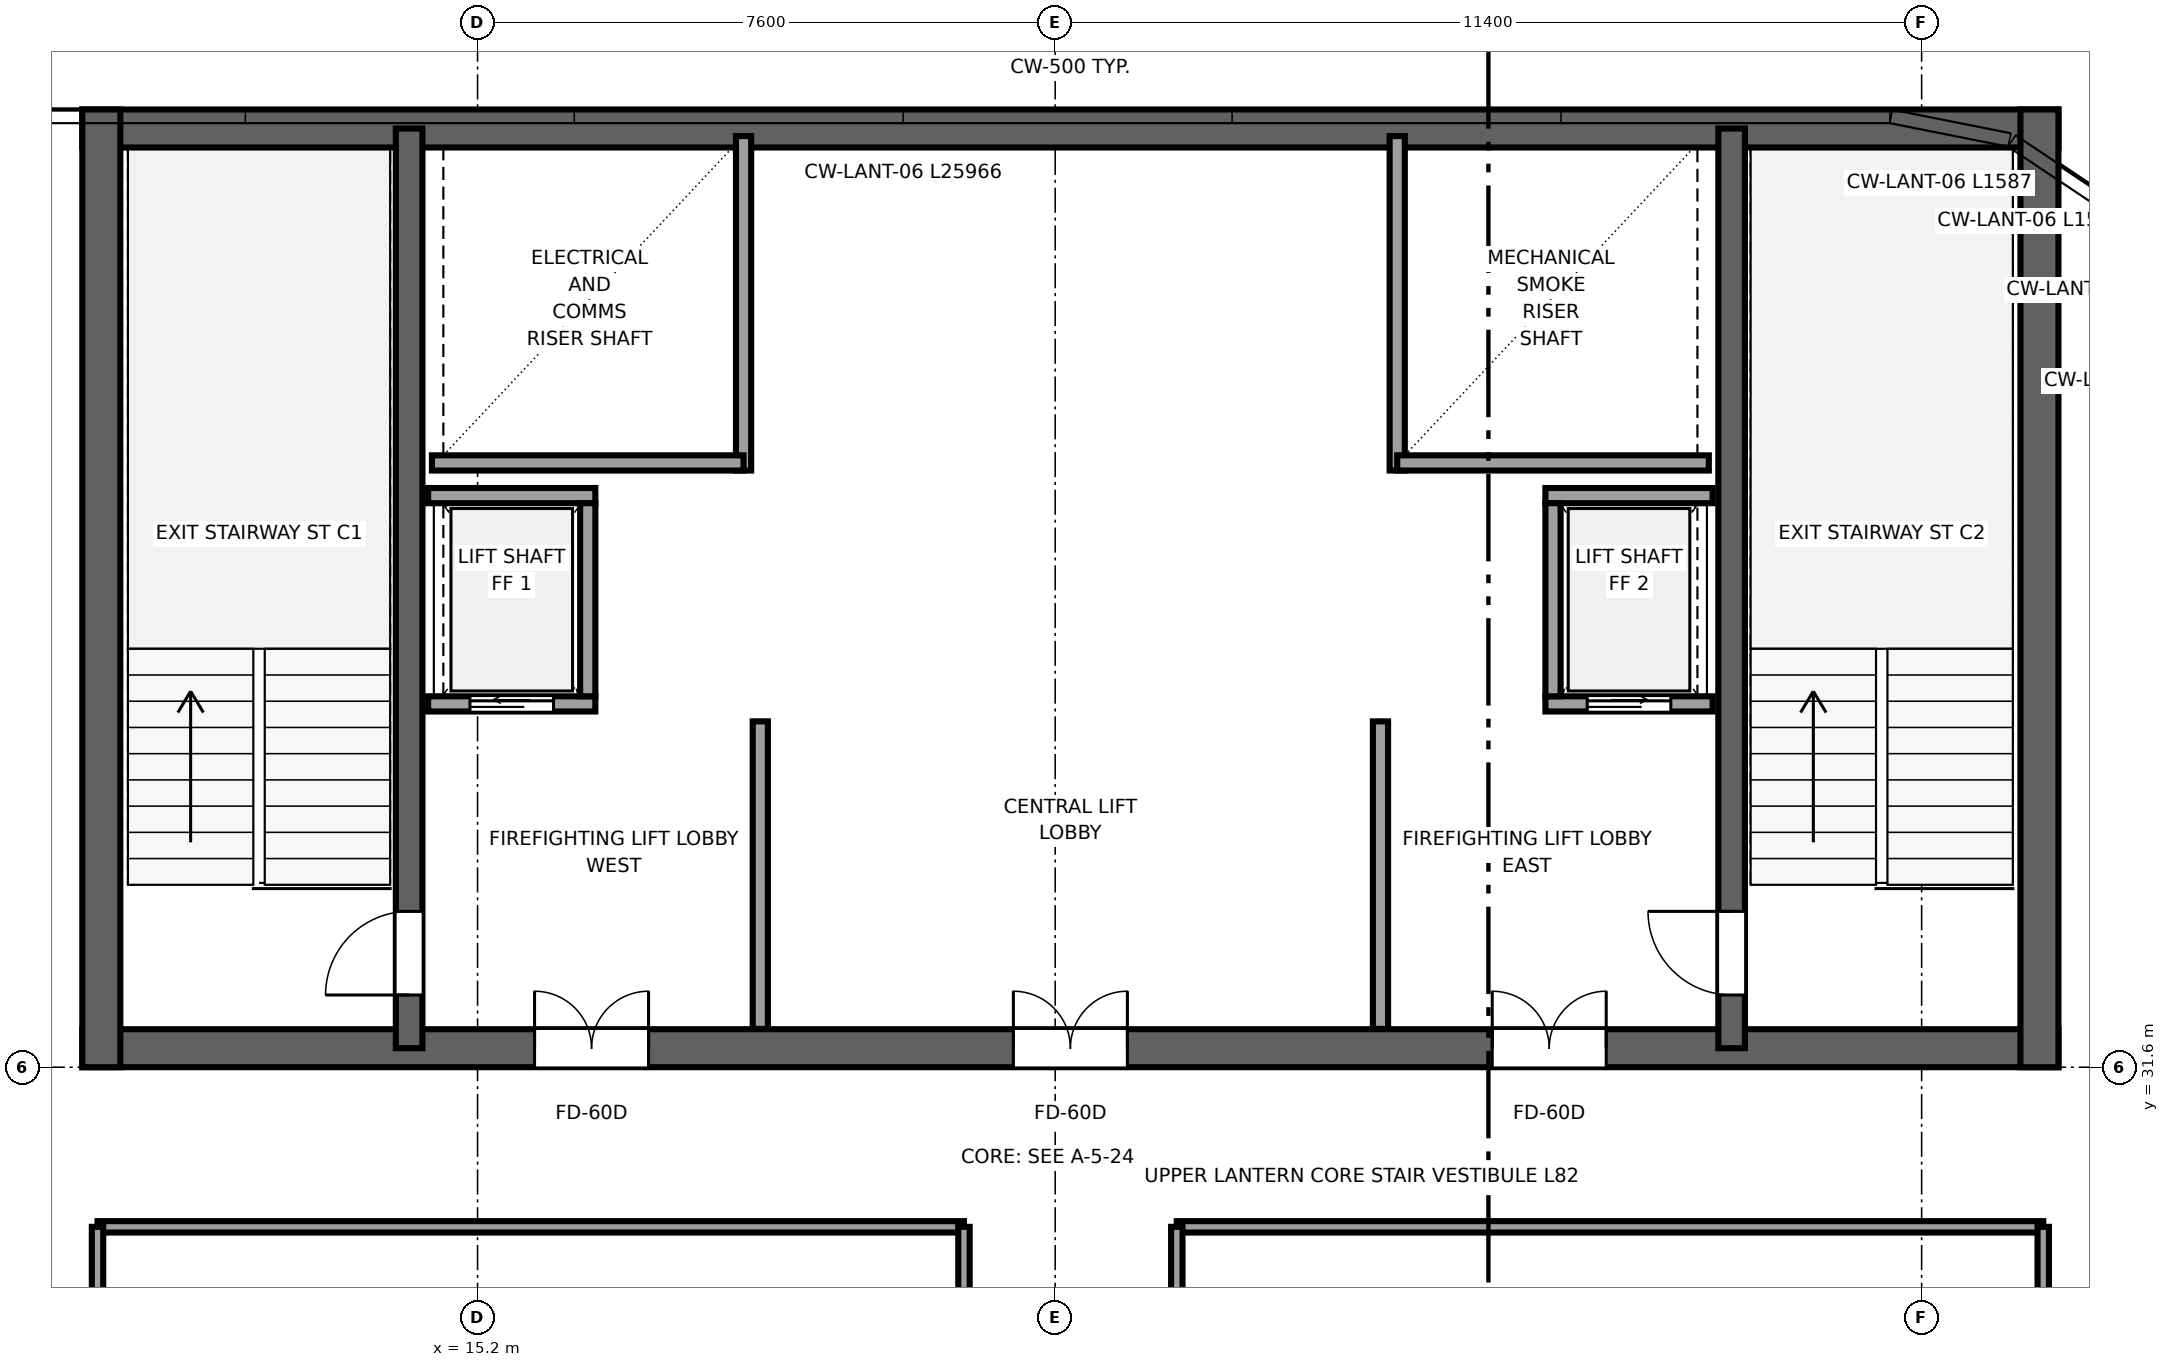
"""IFC4 building model, lengths in metres.
Left out: names, types, materials, properties, quantities, classifications, styles, units other than length and angle.
Written with IfcOpenShell. Run it as: python <this file> out.ifc"""

import sys

from ifc_helpers import new_model, si_unit, direction, frame, frame_2d, origin, place, context, subcontext, project, spatial, rectangle, extrude, source, transform, mapped, element, fill, save


model = new_model("IFC4")
c1 = context("Model", 3, precision=1e-05, world=origin(), true_north=direction((0.0, 1.0)))
c2 = subcontext(c1, "Body", "Model", "MODEL_VIEW")
j1 = project(units=[si_unit("LENGTHUNIT", "METRE"), si_unit("PLANEANGLEUNIT", "RADIAN")], contexts=[c1])
p1 = place(None, origin())
s1 = spatial("IfcSite", under=j1, at=p1, CompositionType="ELEMENT")
p2 = place(p1, origin())
s2 = spatial("IfcBuilding", under=s1, at=p2, CompositionType="ELEMENT")
p3 = place(p2, frame((0.0, 0.0, 309.95)))
s3 = spatial("IfcBuildingStorey", under=s2, at=p3, CompositionType="ELEMENT", Elevation=309.95)
p4 = place(p3, frame((10.0, 31.85, 0.0), z_axis=(0.0, 0.0, 1.0), x_axis=(1.0, 0.0, 0.0)))
e1 = element("IfcWall", 1, at=p4, inside=s3, PredefinedType="SHEAR", context=c2, shape_type="SweptSolid", body=[
    extrude(rectangle(XDim=26.0, YDim=0.5, at=frame_2d((13.0, 0.0))), origin(), (0.0, 0.0, 1.0), 3.8),
])
p5 = place(p4, frame((7.45, 0.0, 0.0), z_axis=(0.0, 0.0, 1.0), x_axis=(-1.0, 0.0, 0.0)))
e2 = element("IfcOpeningElement", 2, at=p5, cuts=e1, PredefinedType="OPENING", context=c2, shape_type="SweptSolid", body=[
    extrude(rectangle(XDim=1.5, YDim=2.04, at=frame_2d((0.75, 1.02))), frame((0.0, 0.26, 0.0), z_axis=(0.0, -1.0, 0.0), x_axis=(1.0, 0.0, 0.0)), (0.0, 0.0, 1.0), 0.52),
])
p6 = place(p4, frame((13.75, 0.0, 0.0), z_axis=(0.0, 0.0, 1.0), x_axis=(-1.0, 0.0, 0.0)))
e3 = element("IfcOpeningElement", 3, at=p6, cuts=e1, PredefinedType="OPENING", context=c2, shape_type="SweptSolid", body=[
    extrude(rectangle(XDim=1.5, YDim=2.04, at=frame_2d((0.75, 1.02))), frame((0.0, 0.26, 0.0), z_axis=(0.0, -1.0, 0.0), x_axis=(1.0, 0.0, 0.0)), (0.0, 0.0, 1.0), 0.52),
])
p7 = place(p4, frame((20.05, 0.0, 0.0), z_axis=(0.0, 0.0, 1.0), x_axis=(-1.0, 0.0, 0.0)))
e4 = element("IfcOpeningElement", 4, at=p7, cuts=e1, PredefinedType="OPENING", context=c2, shape_type="SweptSolid", body=[
    extrude(rectangle(XDim=1.5, YDim=2.04, at=frame_2d((0.75, 1.02))), frame((0.0, 0.26, 0.0), z_axis=(0.0, -1.0, 0.0), x_axis=(1.0, 0.0, 0.0)), (0.0, 0.0, 1.0), 0.52),
])
p8 = place(p3, frame((10.0, 43.95, 0.0), z_axis=(0.0, 0.0, 1.0), x_axis=(1.0, 0.0, 0.0)))
e5 = element("IfcWall", 5, at=p8, inside=s3, PredefinedType="SHEAR", context=c2, shape_type="SweptSolid", body=[
    extrude(rectangle(XDim=26.0, YDim=0.5, at=frame_2d((13.0, 0.0))), origin(), (0.0, 0.0, 1.0), 3.8),
])
for number, where, z_axis, x_axis in (
    (6, (10.25, 31.6, 0.0), (0.0, 0.0, 1.0), (0.0, 1.0, 0.0)),
    (7, (35.75, 31.6, 0.0), (0.0, 0.0, 1.0), (0.0, 1.0, 0.0)),
):
    element("IfcWall", number, at=place(p3, frame(where, z_axis=z_axis, x_axis=x_axis)), inside=s3, PredefinedType="SHEAR", context=c2, shape_type="SweptSolid", body=[
        extrude(rectangle(XDim=12.6, YDim=0.5, at=frame_2d((6.3, 0.0))), origin(), (0.0, 0.0, 1.0), 3.8),
    ])
p9 = place(p3, frame((14.3, 31.85, 0.0), z_axis=(0.0, 0.0, 1.0), x_axis=(0.0, 1.0, 0.0)))
e8 = element("IfcWall", 8, at=p9, inside=s3, PredefinedType="SHEAR", context=c2, shape_type="SweptSolid", body=[
    extrude(rectangle(XDim=12.1, YDim=0.35, at=frame_2d((6.05, 0.0))), origin(), (0.0, 0.0, 1.0), 3.8),
])
p10 = place(p9, frame((0.7, 0.0, 0.0)))
e9 = element("IfcOpeningElement", 9, at=p10, cuts=e8, PredefinedType="OPENING", context=c2, shape_type="SweptSolid", body=[
    extrude(rectangle(XDim=1.1, YDim=2.12, at=frame_2d((0.55, 1.06))), frame((0.0, 0.185, 0.0), z_axis=(0.0, -1.0, 0.0), x_axis=(1.0, 0.0, 0.0)), (0.0, 0.0, 1.0), 0.37),
])
p11 = place(p3, frame((31.7, 31.85, 0.0), z_axis=(0.0, 0.0, 1.0), x_axis=(0.0, 1.0, 0.0)))
e10 = element("IfcWall", 10, at=p11, inside=s3, PredefinedType="SHEAR", context=c2, shape_type="SweptSolid", body=[
    extrude(rectangle(XDim=12.1, YDim=0.35, at=frame_2d((6.05, 0.0))), origin(), (0.0, 0.0, 1.0), 3.8),
])
p12 = place(p11, frame((1.8, 0.0, 0.0), z_axis=(0.0, 0.0, 1.0), x_axis=(-1.0, 0.0, 0.0)))
e11 = element("IfcOpeningElement", 11, at=p12, cuts=e10, PredefinedType="OPENING", context=c2, shape_type="SweptSolid", body=[
    extrude(rectangle(XDim=1.1, YDim=2.12, at=frame_2d((0.55, 1.06))), frame((0.0, 0.185, 0.0), z_axis=(0.0, -1.0, 0.0), x_axis=(1.0, 0.0, 0.0)), (0.0, 0.0, 1.0), 0.37),
])
p13 = place(p3, frame((18.7, 39.45, 0.0), z_axis=(0.0, 0.0, 1.0), x_axis=(0.0, 1.0, 0.0)))
e12 = element("IfcWall", 12, at=p13, inside=s3, PredefinedType="SOLIDWALL", context=c2, shape_type="SweptSolid", body=[
    extrude(rectangle(XDim=4.4, YDim=0.2, at=frame_2d((2.2, 0.0))), origin(), (0.0, 0.0, 1.0), 3.4),
])
p14 = place(p3, frame((14.6, 39.55, 0.0), z_axis=(0.0, 0.0, 1.0), x_axis=(1.0, 0.0, 0.0)))
e13 = element("IfcWall", 13, at=p14, inside=s3, PredefinedType="SOLIDWALL", context=c2, shape_type="SweptSolid", body=[
    extrude(rectangle(XDim=4.1, YDim=0.2, at=frame_2d((2.05, 0.0))), origin(), (0.0, 0.0, 1.0), 3.4),
])
p15 = place(p3, frame((27.3, 39.45, 0.0), z_axis=(0.0, 0.0, 1.0), x_axis=(0.0, 1.0, 0.0)))
e14 = element("IfcWall", 14, at=p15, inside=s3, PredefinedType="SOLIDWALL", context=c2, shape_type="SweptSolid", body=[
    extrude(rectangle(XDim=4.4, YDim=0.2, at=frame_2d((2.2, 0.0))), origin(), (0.0, 0.0, 1.0), 3.4),
])
p16 = place(p3, frame((27.3, 39.55, 0.0), z_axis=(0.0, 0.0, 1.0), x_axis=(1.0, 0.0, 0.0)))
e15 = element("IfcWall", 15, at=p16, inside=s3, PredefinedType="SOLIDWALL", context=c2, shape_type="SweptSolid", body=[
    extrude(rectangle(XDim=4.1, YDim=0.2, at=frame_2d((2.05, 0.0))), origin(), (0.0, 0.0, 1.0), 3.4),
])
for number, where, z_axis, x_axis in (
    (16, (18.92, 32.104, 0.0), (0.0, 0.0, 1.0), (0.0, 1.0, 0.0)),
    (17, (27.08, 32.104, 0.0), (0.0, 0.0, 1.0), (0.0, 1.0, 0.0)),
):
    element("IfcWall", number, at=place(p3, frame(where, z_axis=z_axis, x_axis=x_axis)), inside=s3, PredefinedType="SOLIDWALL", context=c2, shape_type="SweptSolid", body=[
        extrude(rectangle(XDim=4.046, YDim=0.2, at=frame_2d((2.023, 0.0))), origin(), (0.0, 0.0, 1.0), 3.4),
    ])
p17 = place(p3, frame((29.25, 36.38, 0.0), z_axis=(0.0, 0.0, 1.0), x_axis=(1.0, 0.0, 0.0)))
e18 = element("IfcWall", 18, at=p17, inside=s3, PredefinedType="SOLIDWALL", context=c2, shape_type="SweptSolid", body=[
    extrude(rectangle(XDim=2.2, YDim=0.2, at=frame_2d((1.1, 0.0))), origin(), (0.0, 0.0, 1.0), 3.4),
])
p18 = place(p17, frame((0.55, 0.0, 0.0)))
e19 = element("IfcOpeningElement", 19, at=p18, cuts=e18, PredefinedType="OPENING", context=c2, shape_type="SweptSolid", body=[
    extrude(rectangle(XDim=1.1, YDim=2.12, at=frame_2d((0.55, 1.06))), frame((0.0, 0.11, 0.0), z_axis=(0.0, -1.0, 0.0), x_axis=(1.0, 0.0, 0.0)), (0.0, 0.0, 1.0), 0.22),
])
p19 = place(p3, frame((29.25, 39.12, 0.0), z_axis=(0.0, 0.0, 1.0), x_axis=(1.0, 0.0, 0.0)))
e20 = element("IfcWall", 20, at=p19, inside=s3, PredefinedType="SOLIDWALL", context=c2, shape_type="SweptSolid", body=[
    extrude(rectangle(XDim=2.2, YDim=0.2, at=frame_2d((1.1, 0.0))), origin(), (0.0, 0.0, 1.0), 3.4),
])
p20 = place(p3, frame((29.35, 36.48, 0.0), z_axis=(0.0, 0.0, 1.0), x_axis=(0.0, 1.0, 0.0)))
e21 = element("IfcWall", 21, at=p20, inside=s3, PredefinedType="SOLIDWALL", context=c2, shape_type="SweptSolid", body=[
    extrude(rectangle(XDim=2.54, YDim=0.2, at=frame_2d((1.27, 0.0))), origin(), (0.0, 0.0, 1.0), 3.4),
])
p21 = place(p3, frame((14.55, 36.38, 0.0), z_axis=(0.0, 0.0, 1.0), x_axis=(1.0, 0.0, 0.0)))
e22 = element("IfcWall", 22, at=p21, inside=s3, PredefinedType="SOLIDWALL", context=c2, shape_type="SweptSolid", body=[
    extrude(rectangle(XDim=2.2, YDim=0.2, at=frame_2d((1.1, 0.0))), origin(), (0.0, 0.0, 1.0), 3.4),
])
p22 = place(p21, frame((0.55, 0.0, 0.0)))
e23 = element("IfcOpeningElement", 23, at=p22, cuts=e22, PredefinedType="OPENING", context=c2, shape_type="SweptSolid", body=[
    extrude(rectangle(XDim=1.1, YDim=2.12, at=frame_2d((0.55, 1.06))), frame((0.0, 0.11, 0.0), z_axis=(0.0, -1.0, 0.0), x_axis=(1.0, 0.0, 0.0)), (0.0, 0.0, 1.0), 0.22),
])
p23 = place(p3, frame((14.55, 39.12, 0.0), z_axis=(0.0, 0.0, 1.0), x_axis=(1.0, 0.0, 0.0)))
e24 = element("IfcWall", 24, at=p23, inside=s3, PredefinedType="SOLIDWALL", context=c2, shape_type="SweptSolid", body=[
    extrude(rectangle(XDim=2.2, YDim=0.2, at=frame_2d((1.1, 0.0))), origin(), (0.0, 0.0, 1.0), 3.4),
])
p24 = place(p3, frame((16.65, 36.48, 0.0), z_axis=(0.0, 0.0, 1.0), x_axis=(0.0, 1.0, 0.0)))
e25 = element("IfcWall", 25, at=p24, inside=s3, PredefinedType="SOLIDWALL", context=c2, shape_type="SweptSolid", body=[
    extrude(rectangle(XDim=2.54, YDim=0.2, at=frame_2d((1.27, 0.0))), origin(), (0.0, 0.0, 1.0), 3.4),
])
p25 = place(p3, frame((10.2, 29.5, 0.0), z_axis=(0.0, 0.0, 1.0), x_axis=(1.0, 0.0, 0.0)))
e26 = element("IfcWall", 26, at=p25, inside=s3, PredefinedType="PARTITIONING", context=c2, shape_type="SweptSolid", body=[
    extrude(rectangle(XDim=11.4, YDim=0.15, at=frame_2d((5.7, 0.0))), origin(), (0.0, 0.0, 1.0), 3.4),
])
for number, where, z_axis, x_axis in (
    (27, (10.2, 22.0, 0.0), (0.0, 0.0, 1.0), (0.0, 1.0, 0.0)),
    (28, (21.6, 22.0, 0.0), (0.0, 0.0, 1.0), (0.0, 1.0, 0.0)),
):
    element("IfcWall", number, at=place(p3, frame(where, z_axis=z_axis, x_axis=x_axis)), inside=s3, PredefinedType="PARTITIONING", context=c2, shape_type="SweptSolid", body=[
        extrude(rectangle(XDim=7.5, YDim=0.15, at=frame_2d((3.75, 0.0))), origin(), (0.0, 0.0, 1.0), 3.4),
    ])
p26 = place(p3, frame((24.4, 29.5, 0.0), z_axis=(0.0, 0.0, 1.0), x_axis=(1.0, 0.0, 0.0)))
e29 = element("IfcWall", 29, at=p26, inside=s3, PredefinedType="PARTITIONING", context=c2, shape_type="SweptSolid", body=[
    extrude(rectangle(XDim=11.4, YDim=0.15, at=frame_2d((5.7, 0.0))), origin(), (0.0, 0.0, 1.0), 3.4),
])
for number, where, z_axis, x_axis in (
    (30, (24.4, 22.0, 0.0), (0.0, 0.0, 1.0), (0.0, 1.0, 0.0)),
    (31, (35.8, 22.0, 0.0), (0.0, 0.0, 1.0), (0.0, 1.0, 0.0)),
):
    element("IfcWall", number, at=place(p3, frame(where, z_axis=z_axis, x_axis=x_axis)), inside=s3, PredefinedType="PARTITIONING", context=c2, shape_type="SweptSolid", body=[
        extrude(rectangle(XDim=7.5, YDim=0.15, at=frame_2d((3.75, 0.0))), origin(), (0.0, 0.0, 1.0), 3.4),
    ])
m1 = source(origin(), c2, "Body", "SweptSolid", [
    extrude(rectangle(XDim=1.1, YDim=2.12, at=frame_2d((0.55, 1.06))), frame((0.0, 0.025, 0.0), z_axis=(0.0, -1.0, 0.0), x_axis=(1.0, 0.0, 0.0)), (0.0, 0.0, 1.0), 0.05),
])
p27 = place(p10, origin())
e32 = element("IfcDoor", 32, at=p27, inside=s3, OperationType="SINGLE_SWING_LEFT", PredefinedType="DOOR", context=c2, shape_type="MappedRepresentation", body=[
    mapped(m1, transform((0.0, 0.0, 0.0), x_axis=(1.0, 0.0, 0.0), y_axis=(0.0, 1.0, 0.0), z_axis=(0.0, 0.0, 1.0), scale=1.0)),
])
fill(e9, e32)
p28 = place(p12, origin())
e33 = element("IfcDoor", 33, at=p28, inside=s3, OperationType="SINGLE_SWING_RIGHT", PredefinedType="DOOR", context=c2, shape_type="MappedRepresentation", body=[
    mapped(m1, transform((0.0, 0.0, 0.0), x_axis=(1.0, 0.0, 0.0), y_axis=(0.0, 1.0, 0.0), z_axis=(0.0, 0.0, 1.0), scale=1.0)),
])
fill(e11, e33)
m2 = source(origin(), c2, "Body", "SweptSolid", [
    extrude(rectangle(XDim=1.5, YDim=2.04, at=frame_2d((0.75, 1.02))), frame((0.0, 0.025, 0.0), z_axis=(0.0, -1.0, 0.0), x_axis=(1.0, 0.0, 0.0)), (0.0, 0.0, 1.0), 0.05),
])
p29 = place(p5, origin())
e34 = element("IfcDoor", 34, at=p29, inside=s3, OperationType="DOUBLE_DOOR_SINGLE_SWING", PredefinedType="DOOR", context=c2, shape_type="MappedRepresentation", body=[
    mapped(m2, transform((0.0, 0.0, 0.0), x_axis=(1.0, 0.0, 0.0), y_axis=(0.0, 1.0, 0.0), z_axis=(0.0, 0.0, 1.0), scale=1.0)),
])
fill(e2, e34)
p30 = place(p6, origin())
e35 = element("IfcDoor", 35, at=p30, inside=s3, OperationType="DOUBLE_DOOR_SINGLE_SWING", PredefinedType="DOOR", context=c2, shape_type="MappedRepresentation", body=[
    mapped(m2, transform((0.0, 0.0, 0.0), x_axis=(1.0, 0.0, 0.0), y_axis=(0.0, 1.0, 0.0), z_axis=(0.0, 0.0, 1.0), scale=1.0)),
])
fill(e3, e35)
p31 = place(p7, origin())
e36 = element("IfcDoor", 36, at=p31, inside=s3, OperationType="DOUBLE_DOOR_SINGLE_SWING", PredefinedType="DOOR", context=c2, shape_type="MappedRepresentation", body=[
    mapped(m2, transform((0.0, 0.0, 0.0), x_axis=(1.0, 0.0, 0.0), y_axis=(0.0, 1.0, 0.0), z_axis=(0.0, 0.0, 1.0), scale=1.0)),
])
fill(e4, e36)
m3 = source(origin(), c2, "Body", "SweptSolid", [
    extrude(rectangle(XDim=1.1, YDim=2.12, at=frame_2d((0.55, 1.06))), frame((0.0, 0.025, 0.0), z_axis=(0.0, -1.0, 0.0), x_axis=(1.0, 0.0, 0.0)), (0.0, 0.0, 1.0), 0.05),
])
p32 = place(p18, origin())
e37 = element("IfcDoor", 37, at=p32, inside=s3, OperationType="SLIDING_TO_RIGHT", PredefinedType="DOOR", context=c2, shape_type="MappedRepresentation", body=[
    mapped(m3, transform((0.0, 0.0, 0.0), x_axis=(1.0, 0.0, 0.0), y_axis=(0.0, 1.0, 0.0), z_axis=(0.0, 0.0, 1.0), scale=1.0)),
])
fill(e19, e37)
p33 = place(p22, origin())
e38 = element("IfcDoor", 38, at=p33, inside=s3, OperationType="SLIDING_TO_LEFT", PredefinedType="DOOR", context=c2, shape_type="MappedRepresentation", body=[
    mapped(m3, transform((0.0, 0.0, 0.0), x_axis=(1.0, 0.0, 0.0), y_axis=(0.0, 1.0, 0.0), z_axis=(0.0, 0.0, 1.0), scale=1.0)),
])
fill(e23, e38)
save(model, sys.argv[1])
